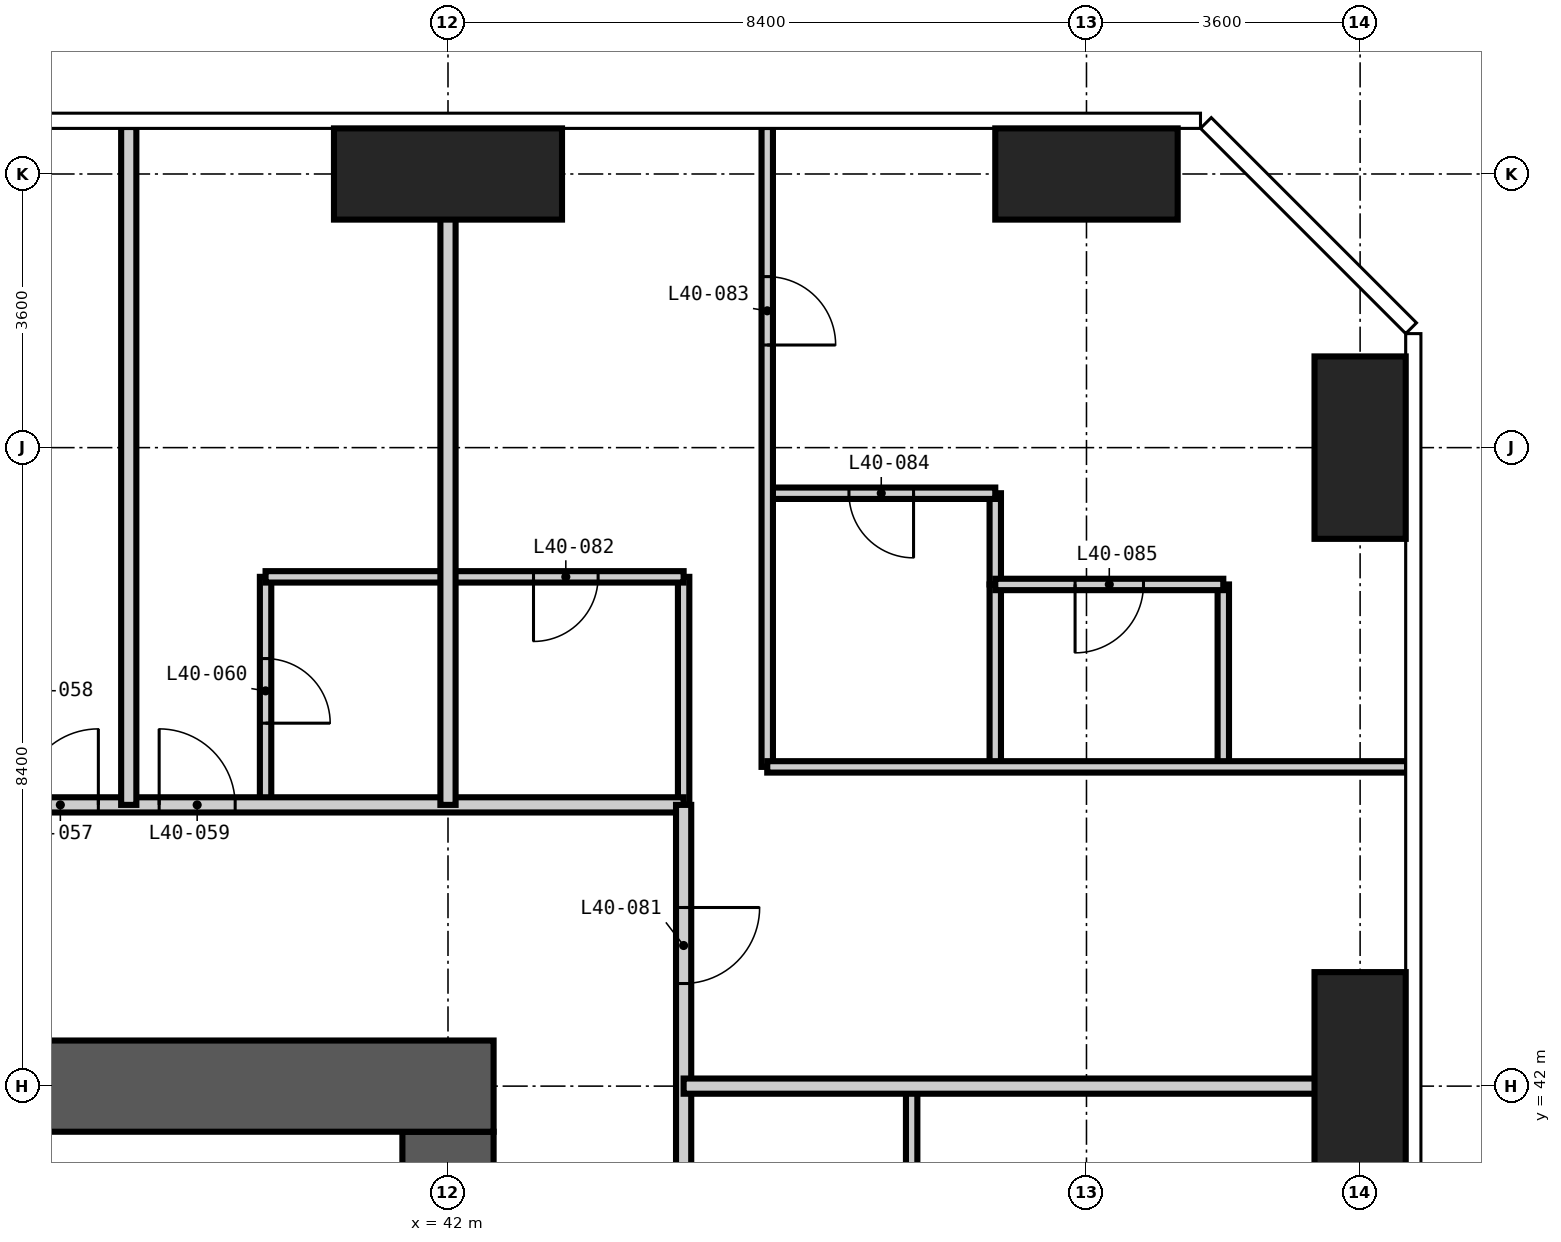
"""IFC4 building model, lengths in metres.
Left out: names, types, materials, properties, quantities, classifications, styles, units other than length and angle.
Written with IfcOpenShell. Run it as: python <this file> out.ifc"""

import sys

from ifc_helpers import new_model, si_unit, direction, frame, frame_2d, origin, origin_2d, place, context, subcontext, project, spatial, rectangle, extrude, element, fill, save


model = new_model("IFC4")
c1 = context("Model", 3, precision=1e-05, world=origin(), true_north=direction((0.0, 1.0)))
c2 = subcontext(c1, "Body", "Model", "MODEL_VIEW")
j1 = project(units=[si_unit("LENGTHUNIT", "METRE"), si_unit("PLANEANGLEUNIT", "RADIAN")], contexts=[c1])
p1 = place(None, origin())
s1 = spatial("IfcSite", under=j1, at=p1, CompositionType="ELEMENT")
p2 = place(p1, origin())
s2 = spatial("IfcBuilding", under=s1, at=p2, CompositionType="ELEMENT")
p3 = place(p2, frame((0.0, 0.0, 159.0)))
s3 = spatial("IfcBuildingStorey", under=s2, at=p3, CompositionType="ELEMENT", Elevation=159.0)
p4 = place(p3, frame((42.0, 54.0, -0.35), z_axis=(0.0, 0.0, 1.0), x_axis=(1.0, 0.0, 0.0)))
e1 = element("IfcColumn", 1, at=p4, inside=s3, PredefinedType="COLUMN", context=c2, shape_type="SweptSolid", body=[
    extrude(rectangle(XDim=3.0, YDim=1.2, at=origin_2d()), origin(), (0.0, 0.0, 1.0), 3.6),
])
p5 = place(p3, frame((50.4, 54.0, -0.35), z_axis=(0.0, 0.0, 1.0), x_axis=(1.0, 0.0, 0.0)))
e2 = element("IfcColumn", 2, at=p5, inside=s3, PredefinedType="COLUMN", context=c2, shape_type="SweptSolid", body=[
    extrude(rectangle(XDim=2.4, YDim=1.2, at=origin_2d()), origin(), (0.0, 0.0, 1.0), 3.6),
])
p6 = place(p3, frame((54.0, 42.0, -0.35), z_axis=(0.0, 0.0, 1.0), x_axis=(1.0, 0.0, 0.0)))
e3 = element("IfcColumn", 3, at=p6, inside=s3, PredefinedType="COLUMN", context=c2, shape_type="SweptSolid", body=[
    extrude(rectangle(XDim=1.2, YDim=3.0, at=origin_2d()), origin(), (0.0, 0.0, 1.0), 3.6),
])
p7 = place(p3, frame((54.0, 50.4, -0.35), z_axis=(0.0, 0.0, 1.0), x_axis=(1.0, 0.0, 0.0)))
e4 = element("IfcColumn", 4, at=p7, inside=s3, PredefinedType="COLUMN", context=c2, shape_type="SweptSolid", body=[
    extrude(rectangle(XDim=1.2, YDim=2.4, at=origin_2d()), origin(), (0.0, 0.0, 1.0), 3.6),
])
p8 = place(p3, frame((42.0, 17.4, -0.35), z_axis=(0.0, 0.0, 1.0), x_axis=(0.0, 1.0, 0.0)))
e5 = element("IfcWall", 5, at=p8, inside=s3, PredefinedType="SHEAR", context=c2, shape_type="SweptSolid", body=[
    extrude(rectangle(XDim=24.0, YDim=1.2, at=frame_2d((12.0, 0.0))), origin(), (0.0, 0.0, 1.0), 3.6),
])
p9 = place(p8, frame((0.2, 0.0, 0.35)))
e6 = element("IfcOpeningElement", 6, at=p9, cuts=e5, PredefinedType="OPENING", context=c2, shape_type="SweptSolid", body=[
    extrude(rectangle(XDim=1.2, YDim=2.2, at=frame_2d((0.6, 1.1))), frame((0.0, 0.61, 0.0), z_axis=(0.0, -1.0, 0.0), x_axis=(1.0, 0.0, 0.0)), (0.0, 0.0, 1.0), 1.22),
])
p10 = place(p8, frame((11.5, 0.0, 0.35)))
e7 = element("IfcOpeningElement", 7, at=p10, cuts=e5, PredefinedType="OPENING", context=c2, shape_type="SweptSolid", body=[
    extrude(rectangle(XDim=1.0, YDim=2.1, at=frame_2d((0.5, 1.05))), frame((0.0, 0.61, 0.0), z_axis=(0.0, -1.0, 0.0), x_axis=(1.0, 0.0, 0.0)), (0.0, 0.0, 1.0), 1.22),
])
p11 = place(p8, frame((19.9, 0.0, 0.35)))
e8 = element("IfcOpeningElement", 8, at=p11, cuts=e5, PredefinedType="OPENING", context=c2, shape_type="SweptSolid", body=[
    extrude(rectangle(XDim=1.0, YDim=2.1, at=frame_2d((0.5, 1.05))), frame((0.0, 0.61, 0.0), z_axis=(0.0, -1.0, 0.0), x_axis=(1.0, 0.0, 0.0)), (0.0, 0.0, 1.0), 1.22),
])
p12 = place(p3, frame((42.6, 42.0, -0.35), z_axis=(0.0, 0.0, 1.0), x_axis=(-1.0, 0.0, 0.0)))
e9 = element("IfcWall", 9, at=p12, inside=s3, PredefinedType="SHEAR", context=c2, shape_type="SweptSolid", body=[
    extrude(rectangle(XDim=26.4, YDim=1.2, at=frame_2d((13.2, 0.0))), origin(), (0.0, 0.0, 1.0), 3.6),
])
p13 = place(p12, frame((21.1, 0.0, 0.35)))
e10 = element("IfcOpeningElement", 10, at=p13, cuts=e9, PredefinedType="OPENING", context=c2, shape_type="SweptSolid", body=[
    extrude(rectangle(XDim=1.0, YDim=2.1, at=frame_2d((0.5, 1.05))), frame((0.0, 0.61, 0.0), z_axis=(0.0, -1.0, 0.0), x_axis=(1.0, 0.0, 0.0)), (0.0, 0.0, 1.0), 1.22),
])
p14 = place(p12, frame((10.5, 0.0, 0.35)))
e11 = element("IfcOpeningElement", 11, at=p14, cuts=e9, PredefinedType="OPENING", context=c2, shape_type="SweptSolid", body=[
    extrude(rectangle(XDim=1.2, YDim=2.2, at=frame_2d((0.6, 1.1))), frame((0.0, 0.61, 0.0), z_axis=(0.0, -1.0, 0.0), x_axis=(1.0, 0.0, 0.0)), (0.0, 0.0, 1.0), 1.22),
])
p15 = place(p3, frame((39.6, 45.7, 0.0), z_axis=(0.0, 0.0, 1.0), x_axis=(0.0, 1.0, 0.0)))
e12 = element("IfcWall", 12, at=p15, inside=s3, PredefinedType="PARTITIONING", context=c2, shape_type="SweptSolid", body=[
    extrude(rectangle(XDim=3.0, YDim=0.15, at=frame_2d((1.5, 0.0))), origin(), (0.0, 0.0, 1.0), 3.25),
])
p16 = place(p15, frame((1.075, 0.0, 0.0)))
e13 = element("IfcOpeningElement", 13, at=p16, cuts=e12, PredefinedType="OPENING", context=c2, shape_type="SweptSolid", body=[
    extrude(rectangle(XDim=0.85, YDim=2.1, at=frame_2d((0.425, 1.05))), frame((0.0, 0.085, 0.0), z_axis=(0.0, -1.0, 0.0), x_axis=(1.0, 0.0, 0.0)), (0.0, 0.0, 1.0), 0.17),
])
p17 = place(p3, frame((45.1, 45.7, 0.0), z_axis=(0.0, 0.0, 1.0), x_axis=(0.0, 1.0, 0.0)))
e14 = element("IfcWall", 14, at=p17, inside=s3, PredefinedType="PARTITIONING", context=c2, shape_type="SweptSolid", body=[
    extrude(rectangle(XDim=3.0, YDim=0.15, at=frame_2d((1.5, 0.0))), origin(), (0.0, 0.0, 1.0), 3.25),
])
p18 = place(p3, frame((48.1, 39.6, 0.0), z_axis=(0.0, 0.0, 1.0), x_axis=(0.0, 1.0, 0.0)))
e15 = element("IfcWall", 15, at=p18, inside=s3, PredefinedType="PARTITIONING", context=c2, shape_type="SweptSolid", body=[
    extrude(rectangle(XDim=2.4, YDim=0.15, at=frame_2d((1.2, 0.0))), origin(), (0.0, 0.0, 1.0), 3.25),
])
p19 = place(p3, frame((49.2, 48.6, 0.0), z_axis=(0.0, 0.0, 1.0), x_axis=(0.0, 1.0, 0.0)))
e16 = element("IfcWall", 16, at=p19, inside=s3, PredefinedType="PARTITIONING", context=c2, shape_type="SweptSolid", body=[
    extrude(rectangle(XDim=1.2, YDim=0.15, at=frame_2d((0.6, 0.0))), origin(), (0.0, 0.0, 1.0), 3.25),
])
p20 = place(p3, frame((39.6, 48.7, 0.0), z_axis=(0.0, 0.0, 1.0), x_axis=(1.0, 0.0, 0.0)))
e17 = element("IfcWall", 17, at=p20, inside=s3, PredefinedType="PARTITIONING", context=c2, shape_type="SweptSolid", body=[
    extrude(rectangle(XDim=5.5, YDim=0.15, at=frame_2d((2.75, 0.0))), origin(), (0.0, 0.0, 1.0), 3.25),
])
p21 = place(p20, frame((3.525, 0.0, 0.0)))
e18 = element("IfcOpeningElement", 18, at=p21, cuts=e17, PredefinedType="OPENING", context=c2, shape_type="SweptSolid", body=[
    extrude(rectangle(XDim=0.85, YDim=2.1, at=frame_2d((0.425, 1.05))), frame((0.0, 0.085, 0.0), z_axis=(0.0, -1.0, 0.0), x_axis=(1.0, 0.0, 0.0)), (0.0, 0.0, 1.0), 0.17),
])
p22 = place(p3, frame((46.2, 49.8, 0.0), z_axis=(0.0, 0.0, 1.0), x_axis=(1.0, 0.0, 0.0)))
e19 = element("IfcWall", 19, at=p22, inside=s3, PredefinedType="PARTITIONING", context=c2, shape_type="SweptSolid", body=[
    extrude(rectangle(XDim=3.0, YDim=0.15, at=frame_2d((1.5, 0.0))), origin(), (0.0, 0.0, 1.0), 3.25),
])
p23 = place(p22, frame((1.075, 0.0, 0.0)))
e20 = element("IfcOpeningElement", 20, at=p23, cuts=e19, PredefinedType="OPENING", context=c2, shape_type="SweptSolid", body=[
    extrude(rectangle(XDim=0.85, YDim=2.1, at=frame_2d((0.425, 1.05))), frame((0.0, 0.085, 0.0), z_axis=(0.0, -1.0, 0.0), x_axis=(1.0, 0.0, 0.0)), (0.0, 0.0, 1.0), 0.17),
])
p24 = place(p3, frame((33.6, 45.7, 0.0), z_axis=(0.0, 0.0, 1.0), x_axis=(1.0, 0.0, 0.0)))
e21 = element("IfcWall", 21, at=p24, inside=s3, PredefinedType="PARTITIONING", context=c2, shape_type="SweptSolid", body=[
    extrude(rectangle(XDim=11.5, YDim=0.2, at=frame_2d((5.75, 0.0))), origin(), (0.0, 0.0, 1.0), 3.25),
])
p25 = place(p24, frame((2.8, 0.0, 0.0)))
e22 = element("IfcOpeningElement", 22, at=p25, cuts=e21, PredefinedType="OPENING", context=c2, shape_type="SweptSolid", body=[
    extrude(rectangle(XDim=1.0, YDim=2.2, at=frame_2d((0.5, 1.1))), frame((0.0, 0.11, 0.0), z_axis=(0.0, -1.0, 0.0), x_axis=(1.0, 0.0, 0.0)), (0.0, 0.0, 1.0), 0.22),
])
p26 = place(p24, frame((4.6, 0.0, 0.0)))
e23 = element("IfcOpeningElement", 23, at=p26, cuts=e21, PredefinedType="OPENING", context=c2, shape_type="SweptSolid", body=[
    extrude(rectangle(XDim=1.0, YDim=2.2, at=frame_2d((0.5, 1.1))), frame((0.0, 0.11, 0.0), z_axis=(0.0, -1.0, 0.0), x_axis=(1.0, 0.0, 0.0)), (0.0, 0.0, 1.0), 0.22),
])
p27 = place(p3, frame((45.1, 45.7, 0.0), z_axis=(0.0, 0.0, 1.0), x_axis=(0.0, -1.0, 0.0)))
e24 = element("IfcWall", 24, at=p27, inside=s3, PredefinedType="PARTITIONING", context=c2, shape_type="SweptSolid", body=[
    extrude(rectangle(XDim=31.4, YDim=0.2, at=frame_2d((15.7, 0.0))), origin(), (0.0, 0.0, 1.0), 3.25),
])
p28 = place(p27, frame((25.1, 0.0, 0.0)))
e25 = element("IfcOpeningElement", 25, at=p28, cuts=e24, PredefinedType="OPENING", context=c2, shape_type="SweptSolid", body=[
    extrude(rectangle(XDim=1.0, YDim=2.2, at=frame_2d((0.5, 1.1))), frame((0.0, 0.11, 0.0), z_axis=(0.0, -1.0, 0.0), x_axis=(1.0, 0.0, 0.0)), (0.0, 0.0, 1.0), 0.22),
])
p29 = place(p27, frame((23.3, 0.0, 0.0)))
e26 = element("IfcOpeningElement", 26, at=p29, cuts=e24, PredefinedType="OPENING", context=c2, shape_type="SweptSolid", body=[
    extrude(rectangle(XDim=1.0, YDim=2.2, at=frame_2d((0.5, 1.1))), frame((0.0, 0.11, 0.0), z_axis=(0.0, -1.0, 0.0), x_axis=(1.0, 0.0, 0.0)), (0.0, 0.0, 1.0), 0.22),
])
p30 = place(p27, frame((16.7, 0.0, 0.0)))
e27 = element("IfcOpeningElement", 27, at=p30, cuts=e24, PredefinedType="OPENING", context=c2, shape_type="SweptSolid", body=[
    extrude(rectangle(XDim=1.0, YDim=2.2, at=frame_2d((0.5, 1.1))), frame((0.0, 0.11, 0.0), z_axis=(0.0, -1.0, 0.0), x_axis=(1.0, 0.0, 0.0)), (0.0, 0.0, 1.0), 0.22),
])
p31 = place(p27, frame((14.9, 0.0, 0.0)))
e28 = element("IfcOpeningElement", 28, at=p31, cuts=e24, PredefinedType="OPENING", context=c2, shape_type="SweptSolid", body=[
    extrude(rectangle(XDim=1.0, YDim=2.2, at=frame_2d((0.5, 1.1))), frame((0.0, 0.11, 0.0), z_axis=(0.0, -1.0, 0.0), x_axis=(1.0, 0.0, 0.0)), (0.0, 0.0, 1.0), 0.22),
])
p32 = place(p27, frame((8.3, 0.0, 0.0)))
e29 = element("IfcOpeningElement", 29, at=p32, cuts=e24, PredefinedType="OPENING", context=c2, shape_type="SweptSolid", body=[
    extrude(rectangle(XDim=1.0, YDim=2.2, at=frame_2d((0.5, 1.1))), frame((0.0, 0.11, 0.0), z_axis=(0.0, -1.0, 0.0), x_axis=(1.0, 0.0, 0.0)), (0.0, 0.0, 1.0), 0.22),
])
p33 = place(p27, frame((6.5, 0.0, 0.0)))
e30 = element("IfcOpeningElement", 30, at=p33, cuts=e24, PredefinedType="OPENING", context=c2, shape_type="SweptSolid", body=[
    extrude(rectangle(XDim=1.0, YDim=2.2, at=frame_2d((0.5, 1.1))), frame((0.0, 0.11, 0.0), z_axis=(0.0, -1.0, 0.0), x_axis=(1.0, 0.0, 0.0)), (0.0, 0.0, 1.0), 0.22),
])
p34 = place(p27, frame((29.65, 0.0, 0.0)))
e31 = element("IfcOpeningElement", 31, at=p34, cuts=e24, PredefinedType="OPENING", context=c2, shape_type="SweptSolid", body=[
    extrude(rectangle(XDim=1.0, YDim=2.2, at=frame_2d((0.5, 1.1))), frame((0.0, 0.11, 0.0), z_axis=(0.0, -1.0, 0.0), x_axis=(1.0, 0.0, 0.0)), (0.0, 0.0, 1.0), 0.22),
])
p35 = place(p27, frame((1.35, 0.0, 0.0)))
e32 = element("IfcOpeningElement", 32, at=p35, cuts=e24, PredefinedType="OPENING", context=c2, shape_type="SweptSolid", body=[
    extrude(rectangle(XDim=1.0, YDim=2.2, at=frame_2d((0.5, 1.1))), frame((0.0, 0.11, 0.0), z_axis=(0.0, -1.0, 0.0), x_axis=(1.0, 0.0, 0.0)), (0.0, 0.0, 1.0), 0.22),
])
for number, where, z_axis, x_axis in (
    (33, (37.8, 45.7, 0.0), (0.0, 0.0, 1.0), (0.0, 1.0, 0.0)),
    (34, (42.0, 45.7, 0.0), (0.0, 0.0, 1.0), (0.0, 1.0, 0.0)),
):
    element("IfcWall", number, at=place(p3, frame(where, z_axis=z_axis, x_axis=x_axis)), inside=s3, PredefinedType="PARTITIONING", context=c2, shape_type="SweptSolid", body=[
        extrude(rectangle(XDim=8.918, YDim=0.2, at=frame_2d((4.459, 0.0))), origin(), (0.0, 0.0, 1.0), 3.25),
    ])
p36 = place(p3, frame((45.1, 42.0, 0.0), z_axis=(0.0, 0.0, 1.0), x_axis=(1.0, 0.0, 0.0)))
e35 = element("IfcWall", 35, at=p36, inside=s3, PredefinedType="PARTITIONING", context=c2, shape_type="SweptSolid", body=[
    extrude(rectangle(XDim=9.518, YDim=0.2, at=frame_2d((4.759, 0.0))), origin(), (0.0, 0.0, 1.0), 3.25),
])
p37 = place(p3, frame((46.2, 46.2, 0.0), z_axis=(0.0, 0.0, 1.0), x_axis=(0.0, 1.0, 0.0)))
e36 = element("IfcWall", 36, at=p37, inside=s3, PredefinedType="PARTITIONING", context=c2, shape_type="SweptSolid", body=[
    extrude(rectangle(XDim=8.418, YDim=0.15, at=frame_2d((4.209, 0.0))), origin(), (0.0, 0.0, 1.0), 3.25),
])
p38 = place(p37, frame((5.55, 0.0, 0.0)))
e37 = element("IfcOpeningElement", 37, at=p38, cuts=e36, PredefinedType="OPENING", context=c2, shape_type="SweptSolid", body=[
    extrude(rectangle(XDim=0.9, YDim=2.1, at=frame_2d((0.45, 1.05))), frame((0.0, 0.085, 0.0), z_axis=(0.0, -1.0, 0.0), x_axis=(1.0, 0.0, 0.0)), (0.0, 0.0, 1.0), 0.17),
])
for number, where, z_axis, x_axis in (
    (38, (49.2, 46.2, 0.0), (0.0, 0.0, 1.0), (0.0, 1.0, 0.0)),
    (39, (52.2, 46.2, 0.0), (0.0, 0.0, 1.0), (0.0, 1.0, 0.0)),
):
    element("IfcWall", number, at=place(p3, frame(where, z_axis=z_axis, x_axis=x_axis)), inside=s3, PredefinedType="PARTITIONING", context=c2, shape_type="SweptSolid", body=[
        extrude(rectangle(XDim=2.4, YDim=0.15, at=frame_2d((1.2, 0.0))), origin(), (0.0, 0.0, 1.0), 3.25),
    ])
p39 = place(p3, frame((46.2, 46.2, 0.0), z_axis=(0.0, 0.0, 1.0), x_axis=(1.0, 0.0, 0.0)))
e40 = element("IfcWall", 40, at=p39, inside=s3, PredefinedType="PARTITIONING", context=c2, shape_type="SweptSolid", body=[
    extrude(rectangle(XDim=8.418, YDim=0.15, at=frame_2d((4.209, 0.0))), origin(), (0.0, 0.0, 1.0), 3.25),
])
p40 = place(p3, frame((49.2, 48.6, 0.0), z_axis=(0.0, 0.0, 1.0), x_axis=(1.0, 0.0, 0.0)))
e41 = element("IfcWall", 41, at=p40, inside=s3, PredefinedType="PARTITIONING", context=c2, shape_type="SweptSolid", body=[
    extrude(rectangle(XDim=3.0, YDim=0.15, at=frame_2d((1.5, 0.0))), origin(), (0.0, 0.0, 1.0), 3.25),
])
p41 = place(p40, frame((1.05, 0.0, 0.0)))
e42 = element("IfcOpeningElement", 42, at=p41, cuts=e41, PredefinedType="OPENING", context=c2, shape_type="SweptSolid", body=[
    extrude(rectangle(XDim=0.9, YDim=2.1, at=frame_2d((0.45, 1.05))), frame((0.0, 0.085, 0.0), z_axis=(0.0, -1.0, 0.0), x_axis=(1.0, 0.0, 0.0)), (0.0, 0.0, 1.0), 0.17),
])
p42 = place(p25, origin())
e43 = element("IfcDoor", 43, at=p42, inside=s3, OperationType="SINGLE_SWING_RIGHT", PredefinedType="DOOR", context=c2, shape_type="SweptSolid", body=[
    extrude(rectangle(XDim=1.0, YDim=2.2, at=frame_2d((0.5, 1.1))), frame((0.0, 0.025, 0.0), z_axis=(0.0, -1.0, 0.0), x_axis=(1.0, 0.0, 0.0)), (0.0, 0.0, 1.0), 0.05),
])
fill(e22, e43)
p43 = place(p26, origin())
e44 = element("IfcDoor", 44, at=p43, inside=s3, OperationType="SINGLE_SWING_LEFT", PredefinedType="DOOR", context=c2, shape_type="SweptSolid", body=[
    extrude(rectangle(XDim=1.0, YDim=2.2, at=frame_2d((0.5, 1.1))), frame((0.0, 0.025, 0.0), z_axis=(0.0, -1.0, 0.0), x_axis=(1.0, 0.0, 0.0)), (0.0, 0.0, 1.0), 0.05),
])
fill(e23, e44)
p44 = place(p16, frame((0.85, 0.0, 0.0), z_axis=(0.0, 0.0, 1.0), x_axis=(-1.0, 0.0, 0.0)))
e45 = element("IfcDoor", 45, at=p44, inside=s3, OperationType="SINGLE_SWING_RIGHT", PredefinedType="DOOR", context=c2, shape_type="SweptSolid", body=[
    extrude(rectangle(XDim=0.85, YDim=2.1, at=frame_2d((0.425, 1.05))), frame((0.0, 0.025, 0.0), z_axis=(0.0, -1.0, 0.0), x_axis=(1.0, 0.0, 0.0)), (0.0, 0.0, 1.0), 0.05),
])
fill(e13, e45)
p45 = place(p35, origin())
e46 = element("IfcDoor", 46, at=p45, inside=s3, OperationType="SINGLE_SWING_LEFT", PredefinedType="DOOR", context=c2, shape_type="SweptSolid", body=[
    extrude(rectangle(XDim=1.0, YDim=2.2, at=frame_2d((0.5, 1.1))), frame((0.0, 0.025, 0.0), z_axis=(0.0, -1.0, 0.0), x_axis=(1.0, 0.0, 0.0)), (0.0, 0.0, 1.0), 0.05),
])
fill(e32, e46)
p46 = place(p21, frame((0.85, 0.0, 0.0), z_axis=(0.0, 0.0, 1.0), x_axis=(-1.0, 0.0, 0.0)))
e47 = element("IfcDoor", 47, at=p46, inside=s3, OperationType="SINGLE_SWING_RIGHT", PredefinedType="DOOR", context=c2, shape_type="SweptSolid", body=[
    extrude(rectangle(XDim=0.85, YDim=2.1, at=frame_2d((0.425, 1.05))), frame((0.0, 0.025, 0.0), z_axis=(0.0, -1.0, 0.0), x_axis=(1.0, 0.0, 0.0)), (0.0, 0.0, 1.0), 0.05),
])
fill(e18, e47)
p47 = place(p38, frame((0.9, 0.0, 0.0), z_axis=(0.0, 0.0, 1.0), x_axis=(-1.0, 0.0, 0.0)))
e48 = element("IfcDoor", 48, at=p47, inside=s3, OperationType="SINGLE_SWING_RIGHT", PredefinedType="DOOR", context=c2, shape_type="SweptSolid", body=[
    extrude(rectangle(XDim=0.9, YDim=2.1, at=frame_2d((0.45, 1.05))), frame((0.0, 0.025, 0.0), z_axis=(0.0, -1.0, 0.0), x_axis=(1.0, 0.0, 0.0)), (0.0, 0.0, 1.0), 0.05),
])
fill(e37, e48)
p48 = place(p23, frame((0.85, 0.0, 0.0), z_axis=(0.0, 0.0, 1.0), x_axis=(-1.0, 0.0, 0.0)))
e49 = element("IfcDoor", 49, at=p48, inside=s3, OperationType="SINGLE_SWING_LEFT", PredefinedType="DOOR", context=c2, shape_type="SweptSolid", body=[
    extrude(rectangle(XDim=0.85, YDim=2.1, at=frame_2d((0.425, 1.05))), frame((0.0, 0.025, 0.0), z_axis=(0.0, -1.0, 0.0), x_axis=(1.0, 0.0, 0.0)), (0.0, 0.0, 1.0), 0.05),
])
fill(e20, e49)
p49 = place(p41, frame((0.9, 0.0, 0.0), z_axis=(0.0, 0.0, 1.0), x_axis=(-1.0, 0.0, 0.0)))
e50 = element("IfcDoor", 50, at=p49, inside=s3, OperationType="SINGLE_SWING_RIGHT", PredefinedType="DOOR", context=c2, shape_type="SweptSolid", body=[
    extrude(rectangle(XDim=0.9, YDim=2.1, at=frame_2d((0.45, 1.05))), frame((0.0, 0.025, 0.0), z_axis=(0.0, -1.0, 0.0), x_axis=(1.0, 0.0, 0.0)), (0.0, 0.0, 1.0), 0.05),
])
fill(e42, e50)
save(model, sys.argv[1])
